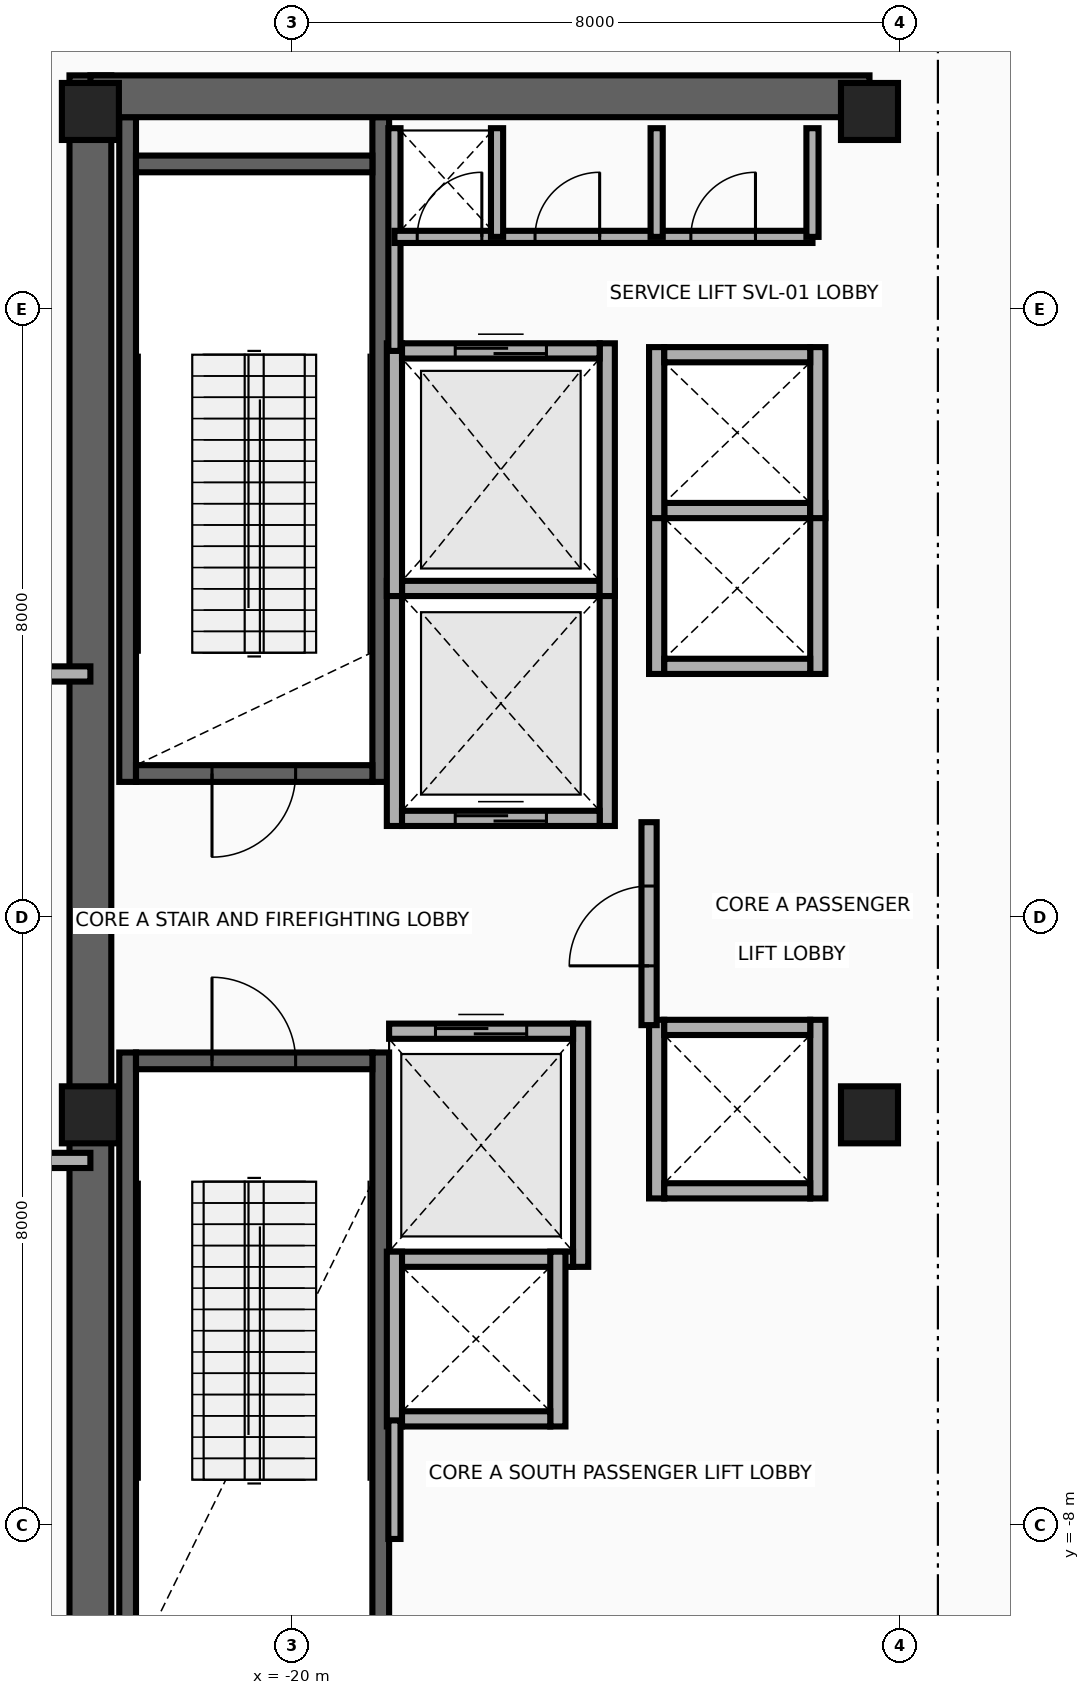
"""IFC4 building model, lengths in metres.
Left out: names, types, materials, properties, quantities, classifications, styles, units other than length and angle.
Written with IfcOpenShell. Run it as: python <this file> out.ifc"""

import sys

from ifc_helpers import new_model, si_unit, direction, frame, frame_2d, origin, origin_2d, place, context, subcontext, project, spatial, rectangle, extrude, source, transform, mapped, element, fill, save


model = new_model("IFC4")
c1 = context("Model", 3, precision=1e-05, world=origin(), true_north=direction((0.0, 1.0)))
c2 = subcontext(c1, "Body", "Model", "MODEL_VIEW")
j1 = project(units=[si_unit("LENGTHUNIT", "METRE"), si_unit("PLANEANGLEUNIT", "RADIAN")], contexts=[c1])
p1 = place(None, origin())
s1 = spatial("IfcSite", under=j1, at=p1, CompositionType="ELEMENT")
p2 = place(p1, origin())
s2 = spatial("IfcBuilding", under=s1, at=p2, CompositionType="ELEMENT")
p3 = place(p2, frame((0.0, 0.0, 294.2)))
s3 = spatial("IfcBuildingStorey", under=s2, at=p3, CompositionType="ELEMENT", Elevation=294.2)
for number, where, z_axis, x_axis in (
    (1, (-22.16, 1.78, 0.0), (0.0, 0.0, 1.0), (0.0, 1.0, 0.0)),
    (2, (-18.83, 1.78, 0.0), (0.0, 0.0, 1.0), (0.0, 1.0, 0.0)),
):
    element("IfcWall", number, at=place(p3, frame(where, z_axis=z_axis, x_axis=x_axis)), inside=s3, PredefinedType="SHEAR", context=c2, shape_type="SweptSolid", body=[
        extrude(rectangle(XDim=8.745, YDim=0.22, at=frame_2d((4.373, 0.0))), origin(), (0.0, 0.0, 1.0), 4.96),
    ])
p4 = place(p3, frame((-22.05, 1.89, 0.0), z_axis=(0.0, 0.0, 1.0), x_axis=(1.0, 0.0, 0.0)))
e3 = element("IfcWall", 3, at=p4, inside=s3, PredefinedType="SHEAR", context=c2, shape_type="SweptSolid", body=[
    extrude(rectangle(XDim=3.11, YDim=0.22, at=frame_2d((1.555, 0.0))), origin(), (0.0, 0.0, 1.0), 4.96),
])
p5 = place(p4, frame((1.0, 0.0, 0.0)))
e4 = element("IfcOpeningElement", 4, at=p5, cuts=e3, PredefinedType="OPENING", context=c2, shape_type="SweptSolid", body=[
    extrude(rectangle(XDim=1.1, YDim=2.15, at=frame_2d((0.55, 1.075))), frame((0.0, 0.125, 0.0), z_axis=(0.0, -1.0, 0.0), x_axis=(1.0, 0.0, 0.0)), (0.0, 0.0, 1.0), 0.25),
])
p6 = place(p3, frame((-22.05, 9.91, 0.0), z_axis=(0.0, 0.0, 1.0), x_axis=(1.0, 0.0, 0.0)))
e5 = element("IfcWall", 5, at=p6, inside=s3, PredefinedType="SHEAR", context=c2, shape_type="SweptSolid", body=[
    extrude(rectangle(XDim=3.11, YDim=0.22, at=frame_2d((1.555, 0.0))), origin(), (0.0, 0.0, 1.0), 4.96),
])
for number, where, z_axis, x_axis in (
    (6, (-22.16, -10.525, 0.0), (0.0, 0.0, 1.0), (0.0, 1.0, 0.0)),
    (7, (-18.83, -10.525, 0.0), (0.0, 0.0, 1.0), (0.0, 1.0, 0.0)),
):
    element("IfcWall", number, at=place(p3, frame(where, z_axis=z_axis, x_axis=x_axis)), inside=s3, PredefinedType="SHEAR", context=c2, shape_type="SweptSolid", body=[
        extrude(rectangle(XDim=8.745, YDim=0.22, at=frame_2d((4.373, 0.0))), origin(), (0.0, 0.0, 1.0), 4.96),
    ])
p7 = place(p3, frame((-22.05, -1.89, 0.0), z_axis=(0.0, 0.0, 1.0), x_axis=(1.0, 0.0, 0.0)))
e8 = element("IfcWall", 8, at=p7, inside=s3, PredefinedType="SHEAR", context=c2, shape_type="SweptSolid", body=[
    extrude(rectangle(XDim=3.11, YDim=0.22, at=frame_2d((1.555, 0.0))), origin(), (0.0, 0.0, 1.0), 4.96),
])
p8 = place(p7, frame((1.0, 0.0, 0.0)))
e9 = element("IfcOpeningElement", 9, at=p8, cuts=e8, PredefinedType="OPENING", context=c2, shape_type="SweptSolid", body=[
    extrude(rectangle(XDim=1.1, YDim=2.15, at=frame_2d((0.55, 1.075))), frame((0.0, 0.125, 0.0), z_axis=(0.0, -1.0, 0.0), x_axis=(1.0, 0.0, 0.0)), (0.0, 0.0, 1.0), 0.25),
])
p9 = place(p3, frame((-22.65, -11.075, 0.0), z_axis=(0.0, 0.0, 1.0), x_axis=(0.0, 1.0, 0.0)))
e10 = element("IfcWall", 10, at=p9, inside=s3, PredefinedType="SHEAR", context=c2, shape_type="SweptSolid", body=[
    extrude(rectangle(XDim=22.15, YDim=0.55, at=frame_2d((11.075, 0.0))), origin(), (0.0, 0.0, 1.0), 4.96),
])
p10 = place(p3, frame((-22.65, 10.8, 0.0), z_axis=(0.0, 0.0, 1.0), x_axis=(1.0, 0.0, 0.0)))
e11 = element("IfcWall", 11, at=p10, inside=s3, PredefinedType="SHEAR", context=c2, shape_type="SweptSolid", body=[
    extrude(rectangle(XDim=10.25, YDim=0.55, at=frame_2d((5.125, 0.0))), origin(), (0.0, 0.0, 1.0), 4.96),
])
m1 = source(origin(), c2, "Body", "SweptSolid", [
    extrude(rectangle(XDim=0.75, YDim=0.75, at=origin_2d()), origin(), (0.0, 0.0, 1.0), 5.2),
])
for number, where, z_axis, x_axis in (
    (12, (-22.65, -2.6, 0.0), (0.0, 0.0, 1.0), (1.0, 0.0, 0.0)),
    (13, (-12.4, -2.6, 0.0), (0.0, 0.0, 1.0), (1.0, 0.0, 0.0)),
    (14, (-22.65, 10.6, 0.0), (0.0, 0.0, 1.0), (1.0, 0.0, 0.0)),
    (15, (-12.4, 10.6, 0.0), (0.0, 0.0, 1.0), (1.0, 0.0, 0.0)),
):
    element("IfcColumn", number, at=place(p3, frame(where, z_axis=z_axis, x_axis=x_axis)), inside=s3, PredefinedType="COLUMN", context=c2, shape_type="MappedRepresentation", body=[
        mapped(m1, transform((0.0, 0.0, 0.0), x_axis=(1.0, 0.0, 0.0), y_axis=(0.0, 1.0, 0.0), z_axis=(0.0, 0.0, 1.0), scale=1.0)),
    ])
for number, where, z_axis, x_axis in (
    (16, (-18.65, 1.2, 0.0), (0.0, 0.0, 1.0), (0.0, 1.0, 0.0)),
    (17, (-15.85, 1.2, 0.0), (0.0, 0.0, 1.0), (0.0, 1.0, 0.0)),
):
    element("IfcWall", number, at=place(p3, frame(where, z_axis=z_axis, x_axis=x_axis)), inside=s3, PredefinedType="MOVABLE", context=c2, shape_type="SweptSolid", body=[
        extrude(rectangle(XDim=3.225, YDim=0.2, at=frame_2d((1.613, 0.0))), origin(), (0.0, 0.0, 1.0), 4.96),
    ])
p11 = place(p3, frame((-18.55, 1.3, 0.0), z_axis=(0.0, 0.0, 1.0), x_axis=(1.0, 0.0, 0.0)))
e18 = element("IfcWall", 18, at=p11, inside=s3, PredefinedType="MOVABLE", context=c2, shape_type="SweptSolid", body=[
    extrude(rectangle(XDim=2.6, YDim=0.2, at=frame_2d((1.3, 0.0))), origin(), (0.0, 0.0, 1.0), 4.96),
])
p12 = place(p11, frame((0.7, 0.0, 0.0)))
e19 = element("IfcOpeningElement", 19, at=p12, cuts=e18, PredefinedType="OPENING", context=c2, shape_type="SweptSolid", body=[
    extrude(rectangle(XDim=1.2, YDim=2.1, at=frame_2d((0.6, 1.05))), frame((0.0, 0.115, 0.0), z_axis=(0.0, -1.0, 0.0), x_axis=(1.0, 0.0, 0.0)), (0.0, 0.0, 1.0), 0.23),
])
p13 = place(p3, frame((-18.55, 4.325, 0.0), z_axis=(0.0, 0.0, 1.0), x_axis=(1.0, 0.0, 0.0)))
e20 = element("IfcWall", 20, at=p13, inside=s3, PredefinedType="MOVABLE", context=c2, shape_type="SweptSolid", body=[
    extrude(rectangle(XDim=2.6, YDim=0.2, at=frame_2d((1.3, 0.0))), origin(), (0.0, 0.0, 1.0), 4.96),
])
p14 = place(p3, frame((-16.2, -4.6, 0.0), z_axis=(0.0, 0.0, 1.0), x_axis=(0.0, 1.0, 0.0)))
e21 = element("IfcWall", 21, at=p14, inside=s3, PredefinedType="MOVABLE", context=c2, shape_type="SweptSolid", body=[
    extrude(rectangle(XDim=3.2, YDim=0.2, at=frame_2d((1.6, 0.0))), origin(), (0.0, 0.0, 1.0), 4.96),
])
p15 = place(p3, frame((-18.72, -4.5, 0.0), z_axis=(0.0, 0.0, 1.0), x_axis=(1.0, 0.0, 0.0)))
e22 = element("IfcWall", 22, at=p15, inside=s3, PredefinedType="MOVABLE", context=c2, shape_type="SweptSolid", body=[
    extrude(rectangle(XDim=2.42, YDim=0.2, at=frame_2d((1.21, 0.0))), origin(), (0.0, 0.0, 1.0), 4.96),
])
p16 = place(p3, frame((-18.72, -1.5, 0.0), z_axis=(0.0, 0.0, 1.0), x_axis=(1.0, 0.0, 0.0)))
e23 = element("IfcWall", 23, at=p16, inside=s3, PredefinedType="MOVABLE", context=c2, shape_type="SweptSolid", body=[
    extrude(rectangle(XDim=2.42, YDim=0.2, at=frame_2d((1.21, 0.0))), origin(), (0.0, 0.0, 1.0), 4.96),
])
p17 = place(p16, frame((0.61, 0.0, 0.0)))
e24 = element("IfcOpeningElement", 24, at=p17, cuts=e23, PredefinedType="OPENING", context=c2, shape_type="SweptSolid", body=[
    extrude(rectangle(XDim=1.2, YDim=2.1, at=frame_2d((0.6, 1.05))), frame((0.0, 0.115, 0.0), z_axis=(0.0, -1.0, 0.0), x_axis=(1.0, 0.0, 0.0)), (0.0, 0.0, 1.0), 0.23),
])
for number, where, z_axis, x_axis in (
    (25, (-18.65, 4.225, 0.0), (0.0, 0.0, 1.0), (0.0, 1.0, 0.0)),
    (26, (-15.85, 4.225, 0.0), (0.0, 0.0, 1.0), (0.0, 1.0, 0.0)),
):
    element("IfcWall", number, at=place(p3, frame(where, z_axis=z_axis, x_axis=x_axis)), inside=s3, PredefinedType="MOVABLE", context=c2, shape_type="SweptSolid", body=[
        extrude(rectangle(XDim=3.325, YDim=0.2, at=frame_2d((1.663, 0.0))), origin(), (0.0, 0.0, 1.0), 4.96),
    ])
p18 = place(p3, frame((-18.55, 7.45, 0.0), z_axis=(0.0, 0.0, 1.0), x_axis=(1.0, 0.0, 0.0)))
e27 = element("IfcWall", 27, at=p18, inside=s3, PredefinedType="MOVABLE", context=c2, shape_type="SweptSolid", body=[
    extrude(rectangle(XDim=2.6, YDim=0.2, at=frame_2d((1.3, 0.0))), origin(), (0.0, 0.0, 1.0), 4.96),
])
p19 = place(p18, frame((0.7, 0.0, 0.0)))
e28 = element("IfcOpeningElement", 28, at=p19, cuts=e27, PredefinedType="OPENING", context=c2, shape_type="SweptSolid", body=[
    extrude(rectangle(XDim=1.2, YDim=2.1, at=frame_2d((0.6, 1.05))), frame((0.0, 0.115, 0.0), z_axis=(0.0, -1.0, 0.0), x_axis=(1.0, 0.0, 0.0)), (0.0, 0.0, 1.0), 0.23),
])
for number, where, z_axis, x_axis in (
    (29, (-15.2, 3.2, 0.0), (0.0, 0.0, 1.0), (0.0, 1.0, 0.0)),
    (30, (-13.08, 3.2, 0.0), (0.0, 0.0, 1.0), (0.0, 1.0, 0.0)),
):
    element("IfcWall", number, at=place(p3, frame(where, z_axis=z_axis, x_axis=x_axis)), inside=s3, PredefinedType="MOVABLE", context=c2, shape_type="SweptSolid", body=[
        extrude(rectangle(XDim=2.25, YDim=0.2, at=frame_2d((1.125, 0.0))), origin(), (0.0, 0.0, 1.0), 4.96),
    ])
for number, where, z_axis, x_axis in (
    (31, (-15.1, 3.3, 0.0), (0.0, 0.0, 1.0), (1.0, 0.0, 0.0)),
    (32, (-15.1, 5.35, 0.0), (0.0, 0.0, 1.0), (1.0, 0.0, 0.0)),
):
    element("IfcWall", number, at=place(p3, frame(where, z_axis=z_axis, x_axis=x_axis)), inside=s3, PredefinedType="MOVABLE", context=c2, shape_type="SweptSolid", body=[
        extrude(rectangle(XDim=1.92, YDim=0.2, at=frame_2d((0.96, 0.0))), origin(), (0.0, 0.0, 1.0), 4.96),
    ])
for number, where, z_axis, x_axis in (
    (33, (-15.2, 5.25, 0.0), (0.0, 0.0, 1.0), (0.0, 1.0, 0.0)),
    (34, (-13.08, 5.25, 0.0), (0.0, 0.0, 1.0), (0.0, 1.0, 0.0)),
):
    element("IfcWall", number, at=place(p3, frame(where, z_axis=z_axis, x_axis=x_axis)), inside=s3, PredefinedType="MOVABLE", context=c2, shape_type="SweptSolid", body=[
        extrude(rectangle(XDim=2.25, YDim=0.2, at=frame_2d((1.125, 0.0))), origin(), (0.0, 0.0, 1.0), 4.96),
    ])
p20 = place(p3, frame((-15.1, 7.4, 0.0), z_axis=(0.0, 0.0, 1.0), x_axis=(1.0, 0.0, 0.0)))
e35 = element("IfcWall", 35, at=p20, inside=s3, PredefinedType="MOVABLE", context=c2, shape_type="SweptSolid", body=[
    extrude(rectangle(XDim=1.92, YDim=0.2, at=frame_2d((0.96, 0.0))), origin(), (0.0, 0.0, 1.0), 4.96),
])
for number, where, z_axis, x_axis in (
    (36, (-18.65, -6.7, 0.0), (0.0, 0.0, 1.0), (0.0, 1.0, 0.0)),
    (37, (-16.5, -6.7, 0.0), (0.0, 0.0, 1.0), (0.0, 1.0, 0.0)),
):
    element("IfcWall", number, at=place(p3, frame(where, z_axis=z_axis, x_axis=x_axis)), inside=s3, PredefinedType="MOVABLE", context=c2, shape_type="SweptSolid", body=[
        extrude(rectangle(XDim=2.3, YDim=0.2, at=frame_2d((1.15, 0.0))), origin(), (0.0, 0.0, 1.0), 4.96),
    ])
p21 = place(p3, frame((-18.55, -6.6, 0.0), z_axis=(0.0, 0.0, 1.0), x_axis=(1.0, 0.0, 0.0)))
e38 = element("IfcWall", 38, at=p21, inside=s3, PredefinedType="MOVABLE", context=c2, shape_type="SweptSolid", body=[
    extrude(rectangle(XDim=1.95, YDim=0.2, at=frame_2d((0.975, 0.0))), origin(), (0.0, 0.0, 1.0), 4.96),
])
for number, where, z_axis, x_axis in (
    (39, (-15.2, -3.7, 0.0), (0.0, 0.0, 1.0), (0.0, 1.0, 0.0)),
    (40, (-13.08, -3.7, 0.0), (0.0, 0.0, 1.0), (0.0, 1.0, 0.0)),
):
    element("IfcWall", number, at=place(p3, frame(where, z_axis=z_axis, x_axis=x_axis)), inside=s3, PredefinedType="MOVABLE", context=c2, shape_type="SweptSolid", body=[
        extrude(rectangle(XDim=2.35, YDim=0.2, at=frame_2d((1.175, 0.0))), origin(), (0.0, 0.0, 1.0), 4.96),
    ])
for number, where, z_axis, x_axis in (
    (41, (-15.1, -3.6, 0.0), (0.0, 0.0, 1.0), (1.0, 0.0, 0.0)),
    (42, (-15.1, -1.45, 0.0), (0.0, 0.0, 1.0), (1.0, 0.0, 0.0)),
):
    element("IfcWall", number, at=place(p3, frame(where, z_axis=z_axis, x_axis=x_axis)), inside=s3, PredefinedType="MOVABLE", context=c2, shape_type="SweptSolid", body=[
        extrude(rectangle(XDim=1.92, YDim=0.2, at=frame_2d((0.96, 0.0))), origin(), (0.0, 0.0, 1.0), 4.96),
    ])
p22 = place(p3, frame((-15.3, -1.42, 0.0), z_axis=(0.0, 0.0, 1.0), x_axis=(0.0, 1.0, 0.0)))
e43 = element("IfcWall", 43, at=p22, inside=s3, PredefinedType="PARTITIONING", context=c2, shape_type="SweptSolid", body=[
    extrude(rectangle(XDim=2.67, YDim=0.2, at=frame_2d((1.335, 0.0))), origin(), (0.0, 0.0, 1.0), 4.96),
])
p23 = place(p22, frame((0.78, 0.0, 0.0)))
e44 = element("IfcOpeningElement", 44, at=p23, cuts=e43, PredefinedType="OPENING", context=c2, shape_type="SweptSolid", body=[
    extrude(rectangle(XDim=1.05, YDim=2.15, at=frame_2d((0.525, 1.075))), frame((0.0, 0.115, 0.0), z_axis=(0.0, -1.0, 0.0), x_axis=(1.0, 0.0, 0.0)), (0.0, 0.0, 1.0), 0.23),
])
p24 = place(p3, frame((-18.65, 7.45, 0.0), z_axis=(0.0, 0.0, 1.0), x_axis=(0.0, 1.0, 0.0)))
e45 = element("IfcWall", 45, at=p24, inside=s3, PredefinedType="PARTITIONING", context=c2, shape_type="SweptSolid", body=[
    extrude(rectangle(XDim=2.93, YDim=0.16, at=frame_2d((1.465, 0.0))), origin(), (0.0, 0.0, 1.0), 4.96),
])
p25 = place(p3, frame((-18.65, -8.18, 0.0), z_axis=(0.0, 0.0, 1.0), x_axis=(0.0, 1.0, 0.0)))
e46 = element("IfcWall", 46, at=p25, inside=s3, PredefinedType="PARTITIONING", context=c2, shape_type="SweptSolid", body=[
    extrude(rectangle(XDim=1.56, YDim=0.16, at=frame_2d((0.78, 0.0))), origin(), (0.0, 0.0, 1.0), 4.96),
])
p26 = place(p3, frame((-18.65, 8.95, 0.0), z_axis=(0.0, 0.0, 1.0), x_axis=(1.0, 0.0, 0.0)))
e47 = element("IfcWall", 47, at=p26, inside=s3, PredefinedType="PARTITIONING", context=c2, shape_type="SweptSolid", body=[
    extrude(rectangle(XDim=5.5, YDim=0.16, at=frame_2d((2.75, 0.0))), origin(), (0.0, 0.0, 1.0), 4.96),
])
p27 = place(p26, frame((0.3, 0.0, 0.0)))
e48 = element("IfcOpeningElement", 48, at=p27, cuts=e47, PredefinedType="OPENING", context=c2, shape_type="SweptSolid", body=[
    extrude(rectangle(XDim=0.85, YDim=2.05, at=frame_2d((0.425, 1.025))), frame((0.0, 0.095, 0.0), z_axis=(0.0, -1.0, 0.0), x_axis=(1.0, 0.0, 0.0)), (0.0, 0.0, 1.0), 0.19),
])
p28 = place(p26, frame((1.85, 0.0, 0.0)))
e49 = element("IfcOpeningElement", 49, at=p28, cuts=e47, PredefinedType="OPENING", context=c2, shape_type="SweptSolid", body=[
    extrude(rectangle(XDim=0.85, YDim=2.05, at=frame_2d((0.425, 1.025))), frame((0.0, 0.095, 0.0), z_axis=(0.0, -1.0, 0.0), x_axis=(1.0, 0.0, 0.0)), (0.0, 0.0, 1.0), 0.19),
])
p29 = place(p26, frame((3.9, 0.0, 0.0)))
e50 = element("IfcOpeningElement", 50, at=p29, cuts=e47, PredefinedType="OPENING", context=c2, shape_type="SweptSolid", body=[
    extrude(rectangle(XDim=0.85, YDim=2.05, at=frame_2d((0.425, 1.025))), frame((0.0, 0.095, 0.0), z_axis=(0.0, -1.0, 0.0), x_axis=(1.0, 0.0, 0.0)), (0.0, 0.0, 1.0), 0.19),
])
for number, where, z_axis, x_axis in (
    (51, (-13.15, 8.95, 0.0), (0.0, 0.0, 1.0), (0.0, 1.0, 0.0)),
    (52, (-17.3, 8.95, 0.0), (0.0, 0.0, 1.0), (0.0, 1.0, 0.0)),
    (53, (-15.2, 8.95, 0.0), (0.0, 0.0, 1.0), (0.0, 1.0, 0.0)),
):
    element("IfcWall", number, at=place(p3, frame(where, z_axis=z_axis, x_axis=x_axis)), inside=s3, PredefinedType="PARTITIONING", context=c2, shape_type="SweptSolid", body=[
        extrude(rectangle(XDim=1.43, YDim=0.16, at=frame_2d((0.715, 0.0))), origin(), (0.0, 0.0, 1.0), 4.96),
    ])
for number, where, z_axis, x_axis in (
    (54, (-30.54, -3.2, 0.0), (0.0, 0.0, 1.0), (1.0, 0.0, 0.0)),
    (55, (-30.54, 3.2, 0.0), (0.0, 0.0, 1.0), (1.0, 0.0, 0.0)),
):
    element("IfcWall", number, at=place(p3, frame(where, z_axis=z_axis, x_axis=x_axis)), inside=s3, PredefinedType="PARTITIONING", context=c2, shape_type="SweptSolid", body=[
        extrude(rectangle(XDim=7.89, YDim=0.2, at=frame_2d((3.945, 0.0))), origin(), (0.0, 0.0, 1.0), 4.334),
    ])
p30 = place(p12, origin())
e56 = element("IfcDoor", 56, at=p30, inside=s3, OperationType="DOUBLE_DOOR_SLIDING", PredefinedType="DOOR", context=c2, shape_type="SweptSolid", body=[
    extrude(rectangle(XDim=1.2, YDim=2.1, at=frame_2d((0.6, 1.05))), frame((0.0, 0.025, 0.0), z_axis=(0.0, -1.0, 0.0), x_axis=(1.0, 0.0, 0.0)), (0.0, 0.0, 1.0), 0.05),
])
fill(e19, e56)
p31 = place(p17, origin())
e57 = element("IfcDoor", 57, at=p31, inside=s3, OperationType="DOUBLE_DOOR_SLIDING", PredefinedType="DOOR", context=c2, shape_type="SweptSolid", body=[
    extrude(rectangle(XDim=1.2, YDim=2.1, at=frame_2d((0.6, 1.05))), frame((0.0, 0.025, 0.0), z_axis=(0.0, -1.0, 0.0), x_axis=(1.0, 0.0, 0.0)), (0.0, 0.0, 1.0), 0.05),
])
fill(e24, e57)
p32 = place(p19, origin())
e58 = element("IfcDoor", 58, at=p32, inside=s3, OperationType="DOUBLE_DOOR_SLIDING", PredefinedType="DOOR", context=c2, shape_type="SweptSolid", body=[
    extrude(rectangle(XDim=1.2, YDim=2.1, at=frame_2d((0.6, 1.05))), frame((0.0, 0.025, 0.0), z_axis=(0.0, -1.0, 0.0), x_axis=(1.0, 0.0, 0.0)), (0.0, 0.0, 1.0), 0.05),
])
fill(e28, e58)
p33 = place(p23, origin())
e59 = element("IfcDoor", 59, at=p33, inside=s3, OperationType="SINGLE_SWING_RIGHT", PredefinedType="DOOR", context=c2, shape_type="SweptSolid", body=[
    extrude(rectangle(XDim=1.05, YDim=2.15, at=frame_2d((0.525, 1.075))), frame((0.0, 0.025, 0.0), z_axis=(0.0, -1.0, 0.0), x_axis=(1.0, 0.0, 0.0)), (0.0, 0.0, 1.0), 0.05),
])
fill(e44, e59)
p34 = place(p5, frame((1.1, 0.0, 0.0), z_axis=(0.0, 0.0, 1.0), x_axis=(-1.0, 0.0, 0.0)))
e60 = element("IfcDoor", 60, at=p34, inside=s3, OperationType="SINGLE_SWING_LEFT", PredefinedType="DOOR", context=c2, shape_type="SweptSolid", body=[
    extrude(rectangle(XDim=1.1, YDim=2.15, at=frame_2d((0.55, 1.075))), frame((0.0, 0.025, 0.0), z_axis=(0.0, -1.0, 0.0), x_axis=(1.0, 0.0, 0.0)), (0.0, 0.0, 1.0), 0.05),
])
fill(e4, e60)
p35 = place(p8, origin())
e61 = element("IfcDoor", 61, at=p35, inside=s3, OperationType="SINGLE_SWING_RIGHT", PredefinedType="DOOR", context=c2, shape_type="SweptSolid", body=[
    extrude(rectangle(XDim=1.1, YDim=2.15, at=frame_2d((0.55, 1.075))), frame((0.0, 0.025, 0.0), z_axis=(0.0, -1.0, 0.0), x_axis=(1.0, 0.0, 0.0)), (0.0, 0.0, 1.0), 0.05),
])
fill(e9, e61)
p36 = place(p27, origin())
e62 = element("IfcDoor", 62, at=p36, inside=s3, OperationType="SINGLE_SWING_LEFT", PredefinedType="DOOR", context=c2, shape_type="SweptSolid", body=[
    extrude(rectangle(XDim=0.85, YDim=2.05, at=frame_2d((0.425, 1.025))), frame((0.0, 0.025, 0.0), z_axis=(0.0, -1.0, 0.0), x_axis=(1.0, 0.0, 0.0)), (0.0, 0.0, 1.0), 0.05),
])
fill(e48, e62)
p37 = place(p28, origin())
e63 = element("IfcDoor", 63, at=p37, inside=s3, OperationType="SINGLE_SWING_RIGHT", PredefinedType="DOOR", context=c2, shape_type="SweptSolid", body=[
    extrude(rectangle(XDim=0.85, YDim=2.05, at=frame_2d((0.425, 1.025))), frame((0.0, 0.025, 0.0), z_axis=(0.0, -1.0, 0.0), x_axis=(1.0, 0.0, 0.0)), (0.0, 0.0, 1.0), 0.05),
])
fill(e49, e63)
p38 = place(p29, origin())
e64 = element("IfcDoor", 64, at=p38, inside=s3, OperationType="SINGLE_SWING_LEFT", PredefinedType="DOOR", context=c2, shape_type="SweptSolid", body=[
    extrude(rectangle(XDim=0.85, YDim=2.05, at=frame_2d((0.425, 1.025))), frame((0.0, 0.025, 0.0), z_axis=(0.0, -1.0, 0.0), x_axis=(1.0, 0.0, 0.0)), (0.0, 0.0, 1.0), 0.05),
])
fill(e50, e64)
save(model, sys.argv[1])
